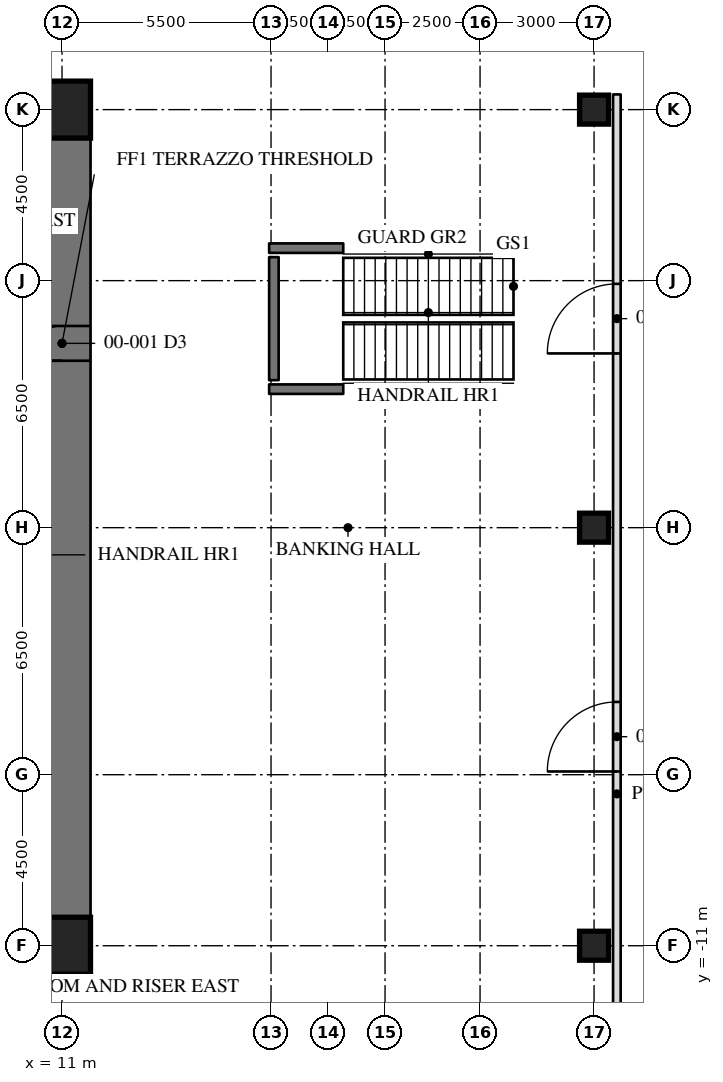
"""IFC4 building model, lengths in metres.
Left out: names, types, materials, properties, quantities, classifications, styles, units other than length and angle.
Written with IfcOpenShell. Run it as: python <this file> out.ifc"""

import sys

from ifc_helpers import new_model, si_unit, direction, frame, frame_2d, origin, origin_2d, place, context, subcontext, project, spatial, rectangle, hollow_rectangle, extrude, element, fill, save


model = new_model("IFC4")
c1 = context("Model", 3, precision=1e-05, world=origin(), true_north=direction((0.0, 1.0)))
c2 = subcontext(c1, "Body", "Model", "MODEL_VIEW")
j1 = project(units=[si_unit("LENGTHUNIT", "METRE"), si_unit("PLANEANGLEUNIT", "RADIAN")], contexts=[c1])
p1 = place(None, origin())
s1 = spatial("IfcSite", under=j1, at=p1, CompositionType="ELEMENT")
p2 = place(p1, origin())
s2 = spatial("IfcBuilding", under=s1, at=p2, CompositionType="ELEMENT")
p3 = place(p2, origin())
s3 = spatial("IfcBuildingStorey", under=s2, at=p3, CompositionType="ELEMENT", Elevation=0.0)
for number, where, z_axis, x_axis in (
    (1, (25.0, -11.0, -0.3), (0.0, 0.0, 1.0), (0.0, 1.0, 0.0)),
    (2, (25.0, 0.0, -0.3), (0.0, 0.0, 1.0), (0.0, 1.0, 0.0)),
    (3, (25.0, 11.0, -0.3), (0.0, 0.0, 1.0), (0.0, 1.0, 0.0)),
):
    element("IfcColumn", number, at=place(p3, frame(where, z_axis=z_axis, x_axis=x_axis)), inside=s3, PredefinedType="COLUMN", context=c2, shape_type="SweptSolid", body=[
        extrude(hollow_rectangle(XDim=0.762, YDim=0.762, WallThickness=0.152, at=origin_2d()), origin(), (0.0, 0.0, 1.0), 6.3),
    ])
p4 = place(p3, frame((11.0, -11.0, -0.3), z_axis=(0.0, 0.0, 1.0), x_axis=(0.0, 1.0, 0.0)))
e4 = element("IfcWall", 4, at=p4, inside=s3, PredefinedType="SHEAR", context=c2, shape_type="SweptSolid", body=[
    extrude(rectangle(XDim=22.0, YDim=1.5, at=frame_2d((11.0, 0.0))), origin(), (0.0, 0.0, 1.0), 6.3),
])
p5 = place(p4, frame((15.393, 0.0, 0.3)))
e5 = element("IfcOpeningElement", 5, at=p5, cuts=e4, PredefinedType="OPENING", context=c2, shape_type="SweptSolid", body=[
    extrude(rectangle(XDim=0.915, YDim=2.134, at=frame_2d((0.458, 1.067))), frame((0.0, 0.76, 0.0), z_axis=(0.0, -1.0, 0.0), x_axis=(1.0, 0.0, 0.0)), (0.0, 0.0, 1.0), 1.52),
])
for number, where, z_axis, x_axis in (
    (6, (11.0, 11.0, -0.3), (0.0, 0.0, 1.0), (-1.0, 0.0, 0.0)),
    (7, (6.5, -11.0, -0.3), (0.0, 0.0, 1.0), (1.0, 0.0, 0.0)),
):
    element("IfcWall", number, at=place(p3, frame(where, z_axis=z_axis, x_axis=x_axis)), inside=s3, PredefinedType="SHEAR", context=c2, shape_type="SweptSolid", body=[
        extrude(rectangle(XDim=4.5, YDim=1.5, at=frame_2d((2.25, 0.0))), origin(), (0.0, 0.0, 1.0), 6.3),
    ])
for number, where, z_axis, x_axis in (
    (8, (11.0, 11.0, -0.3), (0.0, 0.0, 1.0), (1.0, 0.0, 0.0)),
    (9, (11.0, -11.0, -0.3), (0.0, 0.0, 1.0), (1.0, 0.0, 0.0)),
):
    element("IfcColumn", number, at=place(p3, frame(where, z_axis=z_axis, x_axis=x_axis)), inside=s3, PredefinedType="COLUMN", context=c2, shape_type="SweptSolid", body=[
        extrude(hollow_rectangle(XDim=1.499, YDim=1.499, WallThickness=0.102, at=origin_2d()), origin(), (0.0, 0.0, 1.0), 6.3),
    ])
p6 = place(p3, frame((25.6, -25.41, 0.0), z_axis=(0.0, 0.0, 1.0), x_axis=(0.0, 1.0, 0.0)))
e10 = element("IfcWall", 10, at=p6, inside=s3, PredefinedType="PARTITIONING", context=c2, shape_type="SweptSolid", body=[
    extrude(rectangle(XDim=36.81, YDim=0.2, at=frame_2d((18.405, 0.0))), origin(), (0.0, 0.0, 1.0), 5.81),
])
p7 = place(p6, frame((29.995, 0.0, 0.3)))
e11 = element("IfcOpeningElement", 11, at=p7, cuts=e10, PredefinedType="OPENING", context=c2, shape_type="SweptSolid", body=[
    extrude(rectangle(XDim=1.83, YDim=2.134, at=frame_2d((0.915, 1.067))), frame((0.0, 0.11, 0.0), z_axis=(0.0, -1.0, 0.0), x_axis=(1.0, 0.0, 0.0)), (0.0, 0.0, 1.0), 0.22),
])
p8 = place(p6, frame((18.995, 0.0, 0.3)))
e12 = element("IfcOpeningElement", 12, at=p8, cuts=e10, PredefinedType="OPENING", context=c2, shape_type="SweptSolid", body=[
    extrude(rectangle(XDim=1.83, YDim=2.134, at=frame_2d((0.915, 1.067))), frame((0.0, 0.11, 0.0), z_axis=(0.0, -1.0, 0.0), x_axis=(1.0, 0.0, 0.0)), (0.0, 0.0, 1.0), 0.22),
])
p9 = place(p3, frame((16.575, 3.881, 0.0), z_axis=(0.0, 0.0, 1.0), x_axis=(0.0, 1.0, 0.0)))
e13 = element("IfcWall", 13, at=p9, inside=s3, PredefinedType="SOLIDWALL", context=c2, shape_type="SweptSolid", body=[
    extrude(rectangle(XDim=3.238, YDim=0.25, at=frame_2d((1.619, 0.0))), origin(), (0.0, 0.0, 1.0), 5.81),
])
for number, where, z_axis, x_axis in (
    (14, (16.45, 7.355, 0.0), (0.0, 0.0, 1.0), (1.0, 0.0, 0.0)),
    (15, (18.4, 3.645, 0.0), (0.0, 0.0, 1.0), (-1.0, 0.0, 0.0)),
):
    element("IfcWall", number, at=place(p3, frame(where, z_axis=z_axis, x_axis=x_axis)), inside=s3, PredefinedType="SOLIDWALL", context=c2, shape_type="SweptSolid", body=[
        extrude(rectangle(XDim=1.95, YDim=0.25, at=frame_2d((0.975, 0.0))), origin(), (0.0, 0.0, 1.0), 4.883),
    ])
p10 = place(p5, origin())
e16 = element("IfcDoor", 16, at=p10, inside=s3, OperationType="SINGLE_SWING_RIGHT", PredefinedType="DOOR", context=c2, shape_type="SweptSolid", body=[
    extrude(rectangle(XDim=0.915, YDim=2.134, at=frame_2d((0.458, 1.067))), frame((0.0, -0.675, 0.0), z_axis=(0.0, -1.0, 0.0), x_axis=(1.0, 0.0, 0.0)), (0.0, 0.0, 1.0), 0.05),
])
fill(e5, e16)
p11 = place(p7, origin())
e17 = element("IfcDoor", 17, at=p11, inside=s3, OperationType="DOUBLE_DOOR_DOUBLE_SWING", PredefinedType="DOOR", context=c2, shape_type="SweptSolid", body=[
    extrude(rectangle(XDim=1.83, YDim=2.134, at=frame_2d((0.915, 1.067))), frame((0.0, 0.025, 0.0), z_axis=(0.0, -1.0, 0.0), x_axis=(1.0, 0.0, 0.0)), (0.0, 0.0, 1.0), 0.05),
])
fill(e11, e17)
p12 = place(p8, origin())
e18 = element("IfcDoor", 18, at=p12, inside=s3, OperationType="DOUBLE_DOOR_DOUBLE_SWING", PredefinedType="DOOR", context=c2, shape_type="SweptSolid", body=[
    extrude(rectangle(XDim=1.83, YDim=2.134, at=frame_2d((0.915, 1.067))), frame((0.0, 0.025, 0.0), z_axis=(0.0, -1.0, 0.0), x_axis=(1.0, 0.0, 0.0)), (0.0, 0.0, 1.0), 0.05),
])
fill(e12, e18)
save(model, sys.argv[1])
